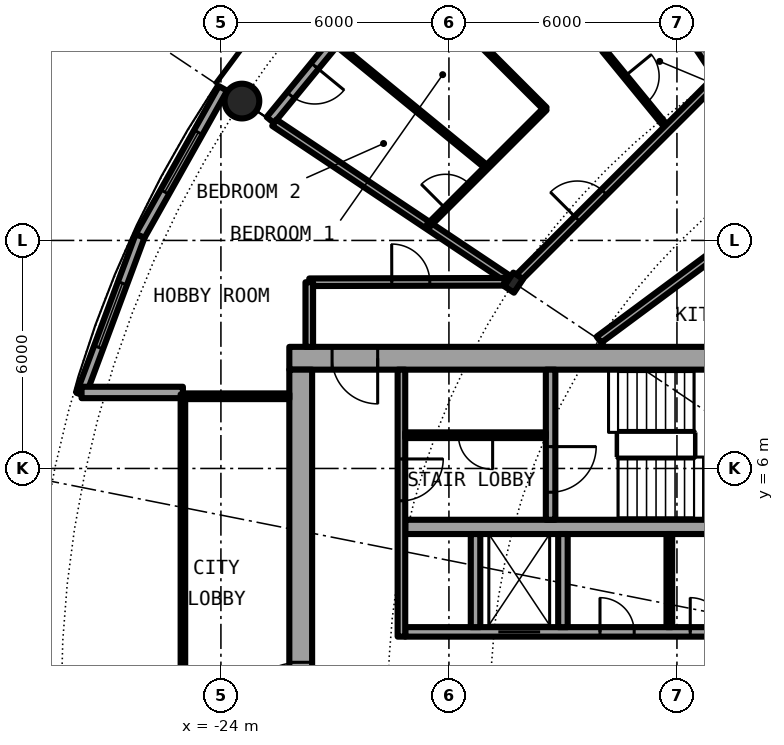
"""IFC4 building model, lengths in metres.
Left out: names, types, materials, properties, quantities, classifications, styles, units other than length and angle.
Written with IfcOpenShell. Run it as: python <this file> out.ifc"""

import sys

from ifc_helpers import new_model, si_unit, direction, frame, frame_2d, origin, origin_2d, place, context, subcontext, project, spatial, rectangle, hollow_circle, i_section, extrude, element, fill, save


model = new_model("IFC4")
c1 = context("Model", 3, precision=1e-05, world=origin(), true_north=direction((0.0, 1.0)))
c2 = subcontext(c1, "Body", "Model", "MODEL_VIEW")
j1 = project(units=[si_unit("LENGTHUNIT", "METRE"), si_unit("PLANEANGLEUNIT", "RADIAN")], contexts=[c1])
p1 = place(None, origin())
s1 = spatial("IfcSite", under=j1, at=p1, CompositionType="ELEMENT")
p2 = place(p1, origin())
s2 = spatial("IfcBuilding", under=s1, at=p2, CompositionType="ELEMENT")
p3 = place(p2, frame((0.0, 0.0, 117.75)))
s3 = spatial("IfcBuildingStorey", under=s2, at=p3, CompositionType="ELEMENT", Elevation=117.75)
p4 = place(p3, frame((-23.448, 15.667, 0.0), z_axis=(0.0, 0.0, 1.0), x_axis=(1.0, 0.0, 0.0)))
e1 = element("IfcColumn", 1, at=p4, inside=s3, PredefinedType="COLUMN", context=c2, shape_type="SweptSolid", body=[
    extrude(hollow_circle(Radius=0.457, WallThickness=0.04, at=origin_2d()), origin(), (0.0, 0.0, 1.0), 3.05),
])
p5 = place(p3, frame((-16.297, 10.889, 0.0), z_axis=(0.0, 0.0, 1.0), x_axis=(-0.831469612303, 0.55557023302, 0.0)))
e2 = element("IfcColumn", 2, at=p5, inside=s3, PredefinedType="COLUMN", context=c2, shape_type="SweptSolid", body=[
    extrude(i_section(OverallWidth=0.307, OverallDepth=0.432, WebThickness=0.021, FlangeThickness=0.04, FilletRadius=0.027, at=origin_2d()), origin(), (0.0, 0.0, 1.0), 3.05),
])
p6 = place(p3, frame((-19.304, 19.304, 0.0), z_axis=(0.0, 0.0, 1.0), x_axis=(-0.634382322723, -0.773019449054, 0.0)))
e3 = element("IfcWall", 3, at=p6, inside=s3, PredefinedType="SOLIDWALL", context=c2, shape_type="SweptSolid", body=[
    extrude(rectangle(XDim=5.352, YDim=0.25, at=frame_2d((2.676, 0.0))), origin(), (0.0, 0.0, 1.0), 2.7),
])
p7 = place(p6, frame((0.441, 0.0, 0.3)))
e4 = element("IfcOpeningElement", 4, at=p7, cuts=e3, PredefinedType="OPENING", context=c2, shape_type="SweptSolid", body=[
    extrude(rectangle(XDim=1.8, YDim=2.1, at=frame_2d((0.9, 1.05))), frame((0.0, 0.135, 0.0), z_axis=(0.0, -1.0, 0.0), x_axis=(1.0, 0.0, 0.0)), (0.0, 0.0, 1.0), 0.27),
])
p8 = place(p6, frame((3.51, 0.0, 0.0)))
e5 = element("IfcOpeningElement", 5, at=p8, cuts=e3, PredefinedType="OPENING", context=c2, shape_type="SweptSolid", body=[
    extrude(rectangle(XDim=1.0, YDim=2.2, at=frame_2d((0.5, 1.1))), frame((0.0, 0.135, 0.0), z_axis=(0.0, -1.0, 0.0), x_axis=(1.0, 0.0, 0.0)), (0.0, 0.0, 1.0), 0.27),
])
p9 = place(p3, frame((-23.946, 16.0, 0.0), z_axis=(0.0, 0.0, 1.0), x_axis=(-0.489696356642, -0.871893042919, 0.0)))
e6 = element("IfcWall", 6, at=p9, inside=s3, PredefinedType="SOLIDWALL", context=c2, shape_type="SweptSolid", body=[
    extrude(rectangle(XDim=4.454, YDim=0.25, at=frame_2d((2.227, 0.0))), origin(), (0.0, 0.0, 1.0), 2.7),
])
p10 = place(p9, frame((1.327, 0.0, 0.3)))
e7 = element("IfcOpeningElement", 7, at=p10, cuts=e6, PredefinedType="OPENING", context=c2, shape_type="SweptSolid", body=[
    extrude(rectangle(XDim=1.8, YDim=2.1, at=frame_2d((0.9, 1.05))), frame((0.0, 0.135, 0.0), z_axis=(0.0, -1.0, 0.0), x_axis=(1.0, 0.0, 0.0)), (0.0, 0.0, 1.0), 0.27),
])
p11 = place(p3, frame((-26.127, 12.117, 0.0), z_axis=(0.0, 0.0, 1.0), x_axis=(-0.349247811493, -0.937030397675, 0.0)))
e8 = element("IfcWall", 8, at=p11, inside=s3, PredefinedType="SOLIDWALL", context=c2, shape_type="SweptSolid", body=[
    extrude(rectangle(XDim=4.452, YDim=0.25, at=frame_2d((2.226, 0.0))), origin(), (0.0, 0.0, 1.0), 2.7),
])
p12 = place(p11, frame((1.327, 0.0, 0.3)))
e9 = element("IfcOpeningElement", 9, at=p12, cuts=e8, PredefinedType="OPENING", context=c2, shape_type="SweptSolid", body=[
    extrude(rectangle(XDim=1.8, YDim=2.1, at=frame_2d((0.9, 1.05))), frame((0.0, 0.135, 0.0), z_axis=(0.0, -1.0, 0.0), x_axis=(1.0, 0.0, 0.0)), (0.0, 0.0, 1.0), 0.27),
])
p13 = place(p3, frame((-25.0, 8.0, 0.0), z_axis=(0.0, 0.0, 1.0), x_axis=(-1.0, 0.0, 0.0)))
e10 = element("IfcWall", 10, at=p13, inside=s3, PredefinedType="SOLIDWALL", context=c2, shape_type="SweptSolid", body=[
    extrude(rectangle(XDim=2.667, YDim=0.3, at=frame_2d((1.333, 0.0))), origin(), (0.0, 0.0, 1.0), 2.7),
])
p14 = place(p3, frame((-8.4, 8.9, 0.0), z_axis=(0.0, 0.0, 1.0), x_axis=(-1.0, 0.0, 0.0)))
e11 = element("IfcWall", 11, at=p14, inside=s3, PredefinedType="SHEAR", context=c2, shape_type="SweptSolid", body=[
    extrude(rectangle(XDim=13.8, YDim=0.6, at=frame_2d((6.9, 0.0))), origin(), (0.0, 0.0, 1.0), 3.05),
])
p15 = place(p14, frame((11.475, 0.0, 0.0)))
e12 = element("IfcOpeningElement", 12, at=p15, cuts=e11, PredefinedType="OPENING", context=c2, shape_type="SweptSolid", body=[
    extrude(rectangle(XDim=1.2, YDim=2.3, at=frame_2d((0.6, 1.15))), frame((0.0, 0.31, 0.0), z_axis=(0.0, -1.0, 0.0), x_axis=(1.0, 0.0, 0.0)), (0.0, 0.0, 1.0), 0.62),
])
p16 = place(p3, frame((-21.9, -8.6, 0.0), z_axis=(0.0, 0.0, 1.0), x_axis=(0.0, 1.0, 0.0)))
e13 = element("IfcWall", 13, at=p16, inside=s3, PredefinedType="SHEAR", context=c2, shape_type="SweptSolid", body=[
    extrude(rectangle(XDim=17.2, YDim=0.6, at=frame_2d((8.6, 0.0))), origin(), (0.0, 0.0, 1.0), 3.05),
])
p17 = place(p16, frame((7.7, 0.0, 0.0)))
e14 = element("IfcOpeningElement", 14, at=p17, cuts=e13, PredefinedType="OPENING", context=c2, shape_type="SweptSolid", body=[
    extrude(rectangle(XDim=1.8, YDim=2.3, at=frame_2d((0.9, 1.15))), frame((0.0, 0.31, 0.0), z_axis=(0.0, -1.0, 0.0), x_axis=(1.0, 0.0, 0.0)), (0.0, 0.0, 1.0), 0.62),
])
p18 = place(p3, frame((-19.15, 1.7, 0.0), z_axis=(0.0, 0.0, 1.0), x_axis=(1.0, 0.0, 0.0)))
e15 = element("IfcWall", 15, at=p18, inside=s3, PredefinedType="SHEAR", context=c2, shape_type="SweptSolid", body=[
    extrude(rectangle(XDim=10.15, YDim=0.25, at=frame_2d((5.075, 0.0))), origin(), (0.0, 0.0, 1.0), 3.05),
])
p19 = place(p18, frame((2.45, 0.0, 0.0)))
e16 = element("IfcOpeningElement", 16, at=p19, cuts=e15, PredefinedType="OPENING", context=c2, shape_type="SweptSolid", body=[
    extrude(rectangle(XDim=1.1, YDim=2.3, at=frame_2d((0.55, 1.15))), frame((0.0, 0.135, 0.0), z_axis=(0.0, -1.0, 0.0), x_axis=(1.0, 0.0, 0.0)), (0.0, 0.0, 1.0), 0.27),
])
p20 = place(p18, frame((9.137, 0.0, 0.0)))
e17 = element("IfcOpeningElement", 17, at=p20, cuts=e15, PredefinedType="OPENING", context=c2, shape_type="SweptSolid", body=[
    extrude(rectangle(XDim=0.9, YDim=2.3, at=frame_2d((0.45, 1.15))), frame((0.0, 0.135, 0.0), z_axis=(0.0, -1.0, 0.0), x_axis=(1.0, 0.0, 0.0)), (0.0, 0.0, 1.0), 0.27),
])
p21 = place(p18, frame((7.5, 0.0, 0.0)))
e18 = element("IfcOpeningElement", 18, at=p21, cuts=e15, PredefinedType="OPENING", context=c2, shape_type="SweptSolid", body=[
    extrude(rectangle(XDim=0.9, YDim=2.3, at=frame_2d((0.45, 1.15))), frame((0.0, 0.135, 0.0), z_axis=(0.0, -1.0, 0.0), x_axis=(1.0, 0.0, 0.0)), (0.0, 0.0, 1.0), 0.27),
])
p22 = place(p18, frame((5.125, 0.0, 0.0)))
e19 = element("IfcOpeningElement", 19, at=p22, cuts=e15, PredefinedType="OPENING", context=c2, shape_type="SweptSolid", body=[
    extrude(rectangle(XDim=0.9, YDim=2.3, at=frame_2d((0.45, 1.15))), frame((0.0, 0.135, 0.0), z_axis=(0.0, -1.0, 0.0), x_axis=(1.0, 0.0, 0.0)), (0.0, 0.0, 1.0), 0.27),
])
p23 = place(p3, frame((-9.0, 4.462, 0.0), z_axis=(0.0, 0.0, 1.0), x_axis=(-1.0, 0.0, 0.0)))
e20 = element("IfcWall", 20, at=p23, inside=s3, PredefinedType="SHEAR", context=c2, shape_type="SweptSolid", body=[
    extrude(rectangle(XDim=10.15, YDim=0.375, at=frame_2d((5.075, 0.0))), origin(), (0.0, 0.0, 1.0), 3.05),
])
p24 = place(p3, frame((-15.325, 8.6, 0.0), z_axis=(0.0, 0.0, 1.0), x_axis=(0.0, -1.0, 0.0)))
e21 = element("IfcWall", 21, at=p24, inside=s3, PredefinedType="SHEAR", context=c2, shape_type="SweptSolid", body=[
    extrude(rectangle(XDim=3.95, YDim=0.25, at=frame_2d((1.975, 0.0))), origin(), (0.0, 0.0, 1.0), 3.05),
])
p25 = place(p24, frame((2.025, 0.0, 0.0)))
e22 = element("IfcOpeningElement", 22, at=p25, cuts=e21, PredefinedType="OPENING", context=c2, shape_type="SweptSolid", body=[
    extrude(rectangle(XDim=1.2, YDim=2.3, at=frame_2d((0.6, 1.15))), frame((0.0, 0.135, 0.0), z_axis=(0.0, -1.0, 0.0), x_axis=(1.0, 0.0, 0.0)), (0.0, 0.0, 1.0), 0.27),
])
for number, where, z_axis, x_axis in (
    (23, (-15.0, 1.825, 0.0), (0.0, 0.0, 1.0), (0.0, 1.0, 0.0)),
    (24, (-17.3, 1.825, 0.0), (0.0, 0.0, 1.0), (0.0, 1.0, 0.0)),
):
    element("IfcWall", number, at=place(p3, frame(where, z_axis=z_axis, x_axis=x_axis)), inside=s3, PredefinedType="SOLIDWALL", context=c2, shape_type="SweptSolid", body=[
        extrude(rectangle(XDim=2.45, YDim=0.25, at=frame_2d((1.225, 0.0))), origin(), (0.0, 0.0, 1.0), 2.7),
    ])
p26 = place(p3, frame((-19.25, 8.6, 0.0), z_axis=(0.0, 0.0, 1.0), x_axis=(0.0, -1.0, 0.0)))
e25 = element("IfcWall", 25, at=p26, inside=s3, PredefinedType="SOLIDWALL", context=c2, shape_type="SweptSolid", body=[
    extrude(rectangle(XDim=7.025, YDim=0.2, at=frame_2d((3.513, 0.0))), origin(), (0.0, 0.0, 1.0), 2.7),
])
p27 = place(p26, frame((2.35, 0.0, 0.0)))
e26 = element("IfcOpeningElement", 26, at=p27, cuts=e25, PredefinedType="OPENING", context=c2, shape_type="SweptSolid", body=[
    extrude(rectangle(XDim=1.1, YDim=2.3, at=frame_2d((0.55, 1.15))), frame((0.0, 0.11, 0.0), z_axis=(0.0, -1.0, 0.0), x_axis=(1.0, 0.0, 0.0)), (0.0, 0.0, 1.0), 0.22),
])
p28 = place(p3, frame((-12.2, 1.825, 0.0), z_axis=(0.0, 0.0, 1.0), x_axis=(0.0, 1.0, 0.0)))
e27 = element("IfcWall", 27, at=p28, inside=s3, PredefinedType="PARTITIONING", context=c2, shape_type="SweptSolid", body=[
    extrude(rectangle(XDim=2.45, YDim=0.15, at=frame_2d((1.225, 0.0))), origin(), (0.0, 0.0, 1.0), 2.7),
])
p29 = place(p3, frame((-15.45, 6.875, 0.0), z_axis=(0.0, 0.0, 1.0), x_axis=(-1.0, 0.0, 0.0)))
e28 = element("IfcWall", 28, at=p29, inside=s3, PredefinedType="PARTITIONING", context=c2, shape_type="SweptSolid", body=[
    extrude(rectangle(XDim=3.7, YDim=0.15, at=frame_2d((1.85, 0.0))), origin(), (0.0, 0.0, 1.0), 2.7),
])
p30 = place(p29, frame((1.4, 0.0, 0.0)))
e29 = element("IfcOpeningElement", 29, at=p30, cuts=e28, PredefinedType="OPENING", context=c2, shape_type="SweptSolid", body=[
    extrude(rectangle(XDim=0.9, YDim=2.3, at=frame_2d((0.45, 1.15))), frame((0.0, 0.085, 0.0), z_axis=(0.0, -1.0, 0.0), x_axis=(1.0, 0.0, 0.0)), (0.0, 0.0, 1.0), 0.17),
])
p31 = place(p3, frame((-22.2, 7.9, 0.0), z_axis=(0.0, 0.0, 1.0), x_axis=(-1.0, 0.0, 0.0)))
e30 = element("IfcWall", 30, at=p31, inside=s3, PredefinedType="PARTITIONING", context=c2, shape_type="SweptSolid", body=[
    extrude(rectangle(XDim=2.74, YDim=0.15, at=frame_2d((1.37, 0.0))), origin(), (0.0, 0.0, 1.0), 2.7),
])
p32 = place(p3, frame((-25.0, 7.95, 0.0), z_axis=(0.0, 0.0, 1.0), x_axis=(0.0, -1.0, 0.0)))
e31 = element("IfcWall", 31, at=p32, inside=s3, PredefinedType="PARTITIONING", context=c2, shape_type="SweptSolid", body=[
    extrude(rectangle(XDim=15.9, YDim=0.12, at=frame_2d((7.95, 0.0))), origin(), (0.0, 0.0, 1.0), 2.7),
])
p33 = place(p32, frame((0.95, 0.0, 0.1)))
e32 = element("IfcOpeningElement", 32, at=p33, cuts=e31, PredefinedType="OPENING", context=c2, shape_type="SweptSolid", body=[
    extrude(rectangle(XDim=14.0, YDim=2.35, at=frame_2d((7.0, 1.175))), frame((0.0, 0.07, 0.0), z_axis=(0.0, -1.0, 0.0), x_axis=(1.0, 0.0, 0.0)), (0.0, 0.0, 1.0), 0.14),
])
p34 = place(p3, frame((-22.595, 15.098, 0.0), z_axis=(0.0, 0.0, 1.0), x_axis=(0.831406593008, -0.555664536482, 0.0)))
e33 = element("IfcWall", 33, at=p34, inside=s3, PredefinedType="PARTITIONING", context=c2, shape_type="SweptSolid", body=[
    extrude(rectangle(XDim=7.358, YDim=0.2, at=frame_2d((3.679, 0.0))), origin(), (0.0, 0.0, 1.0), 2.7),
])
p35 = place(p3, frame((-21.023, 17.22, 0.0), z_axis=(0.0, 0.0, 1.0), x_axis=(0.773517471898, -0.633774976367, 0.0)))
e34 = element("IfcWall", 34, at=p35, inside=s3, PredefinedType="PARTITIONING", context=c2, shape_type="SweptSolid", body=[
    extrude(rectangle(XDim=5.196, YDim=0.1, at=frame_2d((2.598, 0.0))), origin(), (0.0, 0.0, 1.0), 2.7),
])
p36 = place(p3, frame((-19.216, 19.216, 0.0), z_axis=(0.0, 0.0, 1.0), x_axis=(0.707106781187, -0.707106781187, 0.0)))
e35 = element("IfcWall", 35, at=p36, inside=s3, PredefinedType="PARTITIONING", context=c2, shape_type="SweptSolid", body=[
    extrude(rectangle(XDim=5.305, YDim=0.1, at=frame_2d((2.652, 0.0))), origin(), (0.0, 0.0, 1.0), 2.7),
])
p37 = place(p36, frame((2.202, 0.0, 0.0)))
e36 = element("IfcOpeningElement", 36, at=p37, cuts=e35, PredefinedType="OPENING", context=c2, shape_type="SweptSolid", body=[
    extrude(rectangle(XDim=0.9, YDim=2.3, at=frame_2d((0.45, 1.15))), frame((0.0, 0.06, 0.0), z_axis=(0.0, -1.0, 0.0), x_axis=(1.0, 0.0, 0.0)), (0.0, 0.0, 1.0), 0.12),
])
p38 = place(p3, frame((-15.097, 22.595, 0.0), z_axis=(0.0, 0.0, 1.0), x_axis=(0.555572791, -0.831467903109, 0.0)))
e37 = element("IfcWall", 37, at=p38, inside=s3, PredefinedType="PARTITIONING", context=c2, shape_type="SweptSolid", body=[
    extrude(rectangle(XDim=7.358, YDim=0.2, at=frame_2d((3.679, 0.0))), origin(), (0.0, 0.0, 1.0), 2.7),
])
p39 = place(p3, frame((-13.927, 17.004, 0.0), z_axis=(0.0, 0.0, 1.0), x_axis=(0.633582447834, -0.77367517848, 0.0)))
e38 = element("IfcWall", 38, at=p39, inside=s3, PredefinedType="PARTITIONING", context=c2, shape_type="SweptSolid", body=[
    extrude(rectangle(XDim=2.661, YDim=0.1, at=frame_2d((1.331, 0.0))), origin(), (0.0, 0.0, 1.0), 2.7),
])
p40 = place(p39, frame((0.881, 0.0, 0.0)))
e39 = element("IfcOpeningElement", 39, at=p40, cuts=e38, PredefinedType="OPENING", context=c2, shape_type="SweptSolid", body=[
    extrude(rectangle(XDim=0.9, YDim=2.3, at=frame_2d((0.45, 1.15))), frame((0.0, 0.06, 0.0), z_axis=(0.0, -1.0, 0.0), x_axis=(1.0, 0.0, 0.0)), (0.0, 0.0, 1.0), 0.12),
])
p41 = place(p3, frame((-21.675, 10.9, 0.0), z_axis=(0.0, 0.0, 1.0), x_axis=(0.999997173357, 0.002377662213, 0.0)))
e40 = element("IfcWall", 40, at=p41, inside=s3, PredefinedType="PARTITIONING", context=c2, shape_type="SweptSolid", body=[
    extrude(rectangle(XDim=5.134, YDim=0.2, at=frame_2d((2.567, 0.0))), origin(), (0.0, 0.0, 1.0), 2.7),
])
p42 = place(p41, frame((2.171, 0.0, 0.0)))
e41 = element("IfcOpeningElement", 41, at=p42, cuts=e40, PredefinedType="OPENING", context=c2, shape_type="SweptSolid", body=[
    extrude(rectangle(XDim=1.0, YDim=2.3, at=frame_2d((0.5, 1.15))), frame((0.0, 0.11, 0.0), z_axis=(0.0, -1.0, 0.0), x_axis=(1.0, 0.0, 0.0)), (0.0, 0.0, 1.0), 0.22),
])
p43 = place(p3, frame((-14.052, 9.389, 0.0), z_axis=(0.0, 0.0, 1.0), x_axis=(0.803204584823, 0.59570327758, 0.0)))
e42 = element("IfcWall", 42, at=p43, inside=s3, PredefinedType="PARTITIONING", context=c2, shape_type="SweptSolid", body=[
    extrude(rectangle(XDim=11.387, YDim=0.2, at=frame_2d((5.693, 0.0))), origin(), (0.0, 0.0, 1.0), 2.7),
])
p44 = place(p43, frame((6.007, 0.0, 0.0)))
e43 = element("IfcOpeningElement", 43, at=p44, cuts=e42, PredefinedType="OPENING", context=c2, shape_type="SweptSolid", body=[
    extrude(rectangle(XDim=1.0, YDim=2.3, at=frame_2d((0.5, 1.15))), frame((0.0, 0.11, 0.0), z_axis=(0.0, -1.0, 0.0), x_axis=(1.0, 0.0, 0.0)), (0.0, 0.0, 1.0), 0.22),
])
p45 = place(p3, frame((-16.186, 11.0, 0.0), z_axis=(0.0, 0.0, 1.0), x_axis=(0.707106781187, 0.707106781187, 0.0)))
e44 = element("IfcWall", 44, at=p45, inside=s3, PredefinedType="PARTITIONING", context=c2, shape_type="SweptSolid", body=[
    extrude(rectangle(XDim=7.334, YDim=0.2, at=frame_2d((3.667, 0.0))), origin(), (0.0, 0.0, 1.0), 2.39),
])
p46 = place(p45, frame((2.211, 0.0, 0.0)))
e45 = element("IfcOpeningElement", 45, at=p46, cuts=e44, PredefinedType="OPENING", context=c2, shape_type="SweptSolid", body=[
    extrude(rectangle(XDim=1.0, YDim=2.3, at=frame_2d((0.5, 1.15))), frame((0.0, 0.11, 0.0), z_axis=(0.0, -1.0, 0.0), x_axis=(1.0, 0.0, 0.0)), (0.0, 0.0, 1.0), 0.22),
])
p47 = place(p3, frame((-21.675, 9.2, 0.0), z_axis=(0.0, 0.0, 1.0), x_axis=(0.0, 1.0, 0.0)))
e46 = element("IfcWall", 46, at=p47, inside=s3, PredefinedType="PARTITIONING", context=c2, shape_type="SweptSolid", body=[
    extrude(rectangle(XDim=1.7, YDim=0.2, at=frame_2d((0.85, 0.0))), origin(), (0.0, 0.0, 1.0), 2.7),
])
p48 = place(p3, frame((-18.542, 12.389, 0.0), z_axis=(0.0, 0.0, 1.0), x_axis=(0.707190945535, 0.707022606819, 0.0)))
e47 = element("IfcWall", 47, at=p48, inside=s3, PredefinedType="PARTITIONING", context=c2, shape_type="SweptSolid", body=[
    extrude(rectangle(XDim=4.351, YDim=0.1, at=frame_2d((2.175, 0.0))), origin(), (0.0, 0.0, 1.0), 2.7),
])
p49 = place(p48, frame((0.639, 0.0, 0.0)))
e48 = element("IfcOpeningElement", 48, at=p49, cuts=e47, PredefinedType="OPENING", context=c2, shape_type="SweptSolid", body=[
    extrude(rectangle(XDim=0.9, YDim=2.3, at=frame_2d((0.45, 1.15))), frame((0.0, 0.06, 0.0), z_axis=(0.0, -1.0, 0.0), x_axis=(1.0, 0.0, 0.0)), (0.0, 0.0, 1.0), 0.12),
])
p50 = place(p8, origin())
e49 = element("IfcDoor", 49, at=p50, inside=s3, OperationType="SINGLE_SWING_LEFT", PredefinedType="DOOR", context=c2, shape_type="SweptSolid", body=[
    extrude(rectangle(XDim=1.0, YDim=2.2, at=frame_2d((0.5, 1.1))), frame((0.0, 0.025, 0.0), z_axis=(0.0, -1.0, 0.0), x_axis=(1.0, 0.0, 0.0)), (0.0, 0.0, 1.0), 0.05),
])
fill(e5, e49)
p51 = place(p10, origin())
e50 = element("IfcWindow", 50, at=p51, inside=s3, PartitioningType="SINGLE_PANEL", PredefinedType="WINDOW", context=c2, shape_type="SweptSolid", body=[
    extrude(rectangle(XDim=1.8, YDim=2.1, at=frame_2d((0.9, 1.05))), frame((0.0, 0.03, 0.0), z_axis=(0.0, -1.0, 0.0), x_axis=(1.0, 0.0, 0.0)), (0.0, 0.0, 1.0), 0.06),
])
fill(e7, e50)
p52 = place(p12, origin())
e51 = element("IfcWindow", 51, at=p52, inside=s3, PartitioningType="SINGLE_PANEL", PredefinedType="WINDOW", context=c2, shape_type="SweptSolid", body=[
    extrude(rectangle(XDim=1.8, YDim=2.1, at=frame_2d((0.9, 1.05))), frame((0.0, 0.03, 0.0), z_axis=(0.0, -1.0, 0.0), x_axis=(1.0, 0.0, 0.0)), (0.0, 0.0, 1.0), 0.06),
])
fill(e9, e51)
p53 = place(p19, origin())
e52 = element("IfcDoor", 52, at=p53, inside=s3, OperationType="DOUBLE_DOOR_SLIDING", PredefinedType="DOOR", context=c2, shape_type="SweptSolid", body=[
    extrude(rectangle(XDim=1.1, YDim=2.3, at=frame_2d((0.55, 1.15))), frame((0.0, 0.025, 0.0), z_axis=(0.0, -1.0, 0.0), x_axis=(1.0, 0.0, 0.0)), (0.0, 0.0, 1.0), 0.05),
])
fill(e16, e52)
p54 = place(p21, origin())
e53 = element("IfcDoor", 53, at=p54, inside=s3, OperationType="SINGLE_SWING_LEFT", PredefinedType="DOOR", context=c2, shape_type="SweptSolid", body=[
    extrude(rectangle(XDim=0.9, YDim=2.3, at=frame_2d((0.45, 1.15))), frame((0.0, 0.025, 0.0), z_axis=(0.0, -1.0, 0.0), x_axis=(1.0, 0.0, 0.0)), (0.0, 0.0, 1.0), 0.05),
])
fill(e18, e53)
p55 = place(p22, origin())
e54 = element("IfcDoor", 54, at=p55, inside=s3, OperationType="SINGLE_SWING_LEFT", PredefinedType="DOOR", context=c2, shape_type="SweptSolid", body=[
    extrude(rectangle(XDim=0.9, YDim=2.3, at=frame_2d((0.45, 1.15))), frame((0.0, 0.025, 0.0), z_axis=(0.0, -1.0, 0.0), x_axis=(1.0, 0.0, 0.0)), (0.0, 0.0, 1.0), 0.05),
])
fill(e19, e54)
p56 = place(p30, origin())
e55 = element("IfcDoor", 55, at=p56, inside=s3, OperationType="SINGLE_SWING_LEFT", PredefinedType="DOOR", context=c2, shape_type="SweptSolid", body=[
    extrude(rectangle(XDim=0.9, YDim=2.3, at=frame_2d((0.45, 1.15))), frame((0.0, 0.025, 0.0), z_axis=(0.0, -1.0, 0.0), x_axis=(1.0, 0.0, 0.0)), (0.0, 0.0, 1.0), 0.05),
])
fill(e29, e55)
p57 = place(p25, origin())
e56 = element("IfcDoor", 56, at=p57, inside=s3, OperationType="SINGLE_SWING_LEFT", PredefinedType="DOOR", context=c2, shape_type="SweptSolid", body=[
    extrude(rectangle(XDim=1.2, YDim=2.3, at=frame_2d((0.6, 1.15))), frame((0.0, 0.025, 0.0), z_axis=(0.0, -1.0, 0.0), x_axis=(1.0, 0.0, 0.0)), (0.0, 0.0, 1.0), 0.05),
])
fill(e22, e56)
p58 = place(p27, origin())
e57 = element("IfcDoor", 57, at=p58, inside=s3, OperationType="SINGLE_SWING_RIGHT", PredefinedType="DOOR", context=c2, shape_type="SweptSolid", body=[
    extrude(rectangle(XDim=1.1, YDim=2.3, at=frame_2d((0.55, 1.15))), frame((0.0, 0.025, 0.0), z_axis=(0.0, -1.0, 0.0), x_axis=(1.0, 0.0, 0.0)), (0.0, 0.0, 1.0), 0.05),
])
fill(e26, e57)
p59 = place(p15, origin())
e58 = element("IfcDoor", 58, at=p59, inside=s3, OperationType="SINGLE_SWING_LEFT", PredefinedType="DOOR", context=c2, shape_type="SweptSolid", body=[
    extrude(rectangle(XDim=1.2, YDim=2.3, at=frame_2d((0.6, 1.15))), frame((0.0, 0.025, 0.0), z_axis=(0.0, -1.0, 0.0), x_axis=(1.0, 0.0, 0.0)), (0.0, 0.0, 1.0), 0.05),
])
fill(e12, e58)
p60 = place(p17, origin())
e59 = element("IfcDoor", 59, at=p60, inside=s3, OperationType="SINGLE_SWING_LEFT", PredefinedType="DOOR", context=c2, shape_type="SweptSolid", body=[
    extrude(rectangle(XDim=1.8, YDim=2.3, at=frame_2d((0.9, 1.15))), frame((0.0, 0.025, 0.0), z_axis=(0.0, -1.0, 0.0), x_axis=(1.0, 0.0, 0.0)), (0.0, 0.0, 1.0), 0.05),
])
fill(e14, e59)
p61 = place(p33, origin())
e60 = element("IfcWindow", 60, at=p61, inside=s3, PartitioningType="SINGLE_PANEL", PredefinedType="WINDOW", context=c2, shape_type="SweptSolid", body=[
    extrude(rectangle(XDim=14.0, YDim=2.35, at=frame_2d((7.0, 1.175))), frame((0.0, 0.03, 0.0), z_axis=(0.0, -1.0, 0.0), x_axis=(1.0, 0.0, 0.0)), (0.0, 0.0, 1.0), 0.06),
])
fill(e32, e60)
p62 = place(p46, origin())
e61 = element("IfcDoor", 61, at=p62, inside=s3, OperationType="SINGLE_SWING_LEFT", PredefinedType="DOOR", context=c2, shape_type="SweptSolid", body=[
    extrude(rectangle(XDim=1.0, YDim=2.3, at=frame_2d((0.5, 1.15))), frame((0.0, 0.025, 0.0), z_axis=(0.0, -1.0, 0.0), x_axis=(1.0, 0.0, 0.0)), (0.0, 0.0, 1.0), 0.05),
])
fill(e45, e61)
p63 = place(p40, origin())
e62 = element("IfcDoor", 62, at=p63, inside=s3, OperationType="SINGLE_SWING_RIGHT", PredefinedType="DOOR", context=c2, shape_type="SweptSolid", body=[
    extrude(rectangle(XDim=0.9, YDim=2.3, at=frame_2d((0.45, 1.15))), frame((0.0, 0.025, 0.0), z_axis=(0.0, -1.0, 0.0), x_axis=(1.0, 0.0, 0.0)), (0.0, 0.0, 1.0), 0.05),
])
fill(e39, e62)
p64 = place(p49, origin())
e63 = element("IfcDoor", 63, at=p64, inside=s3, OperationType="SINGLE_SWING_LEFT", PredefinedType="DOOR", context=c2, shape_type="SweptSolid", body=[
    extrude(rectangle(XDim=0.9, YDim=2.3, at=frame_2d((0.45, 1.15))), frame((0.0, 0.025, 0.0), z_axis=(0.0, -1.0, 0.0), x_axis=(1.0, 0.0, 0.0)), (0.0, 0.0, 1.0), 0.05),
])
fill(e48, e63)
p65 = place(p42, origin())
e64 = element("IfcDoor", 64, at=p65, inside=s3, OperationType="SINGLE_SWING_RIGHT", PredefinedType="DOOR", context=c2, shape_type="SweptSolid", body=[
    extrude(rectangle(XDim=1.0, YDim=2.3, at=frame_2d((0.5, 1.15))), frame((0.0, 0.025, 0.0), z_axis=(0.0, -1.0, 0.0), x_axis=(1.0, 0.0, 0.0)), (0.0, 0.0, 1.0), 0.05),
])
fill(e41, e64)
save(model, sys.argv[1])
